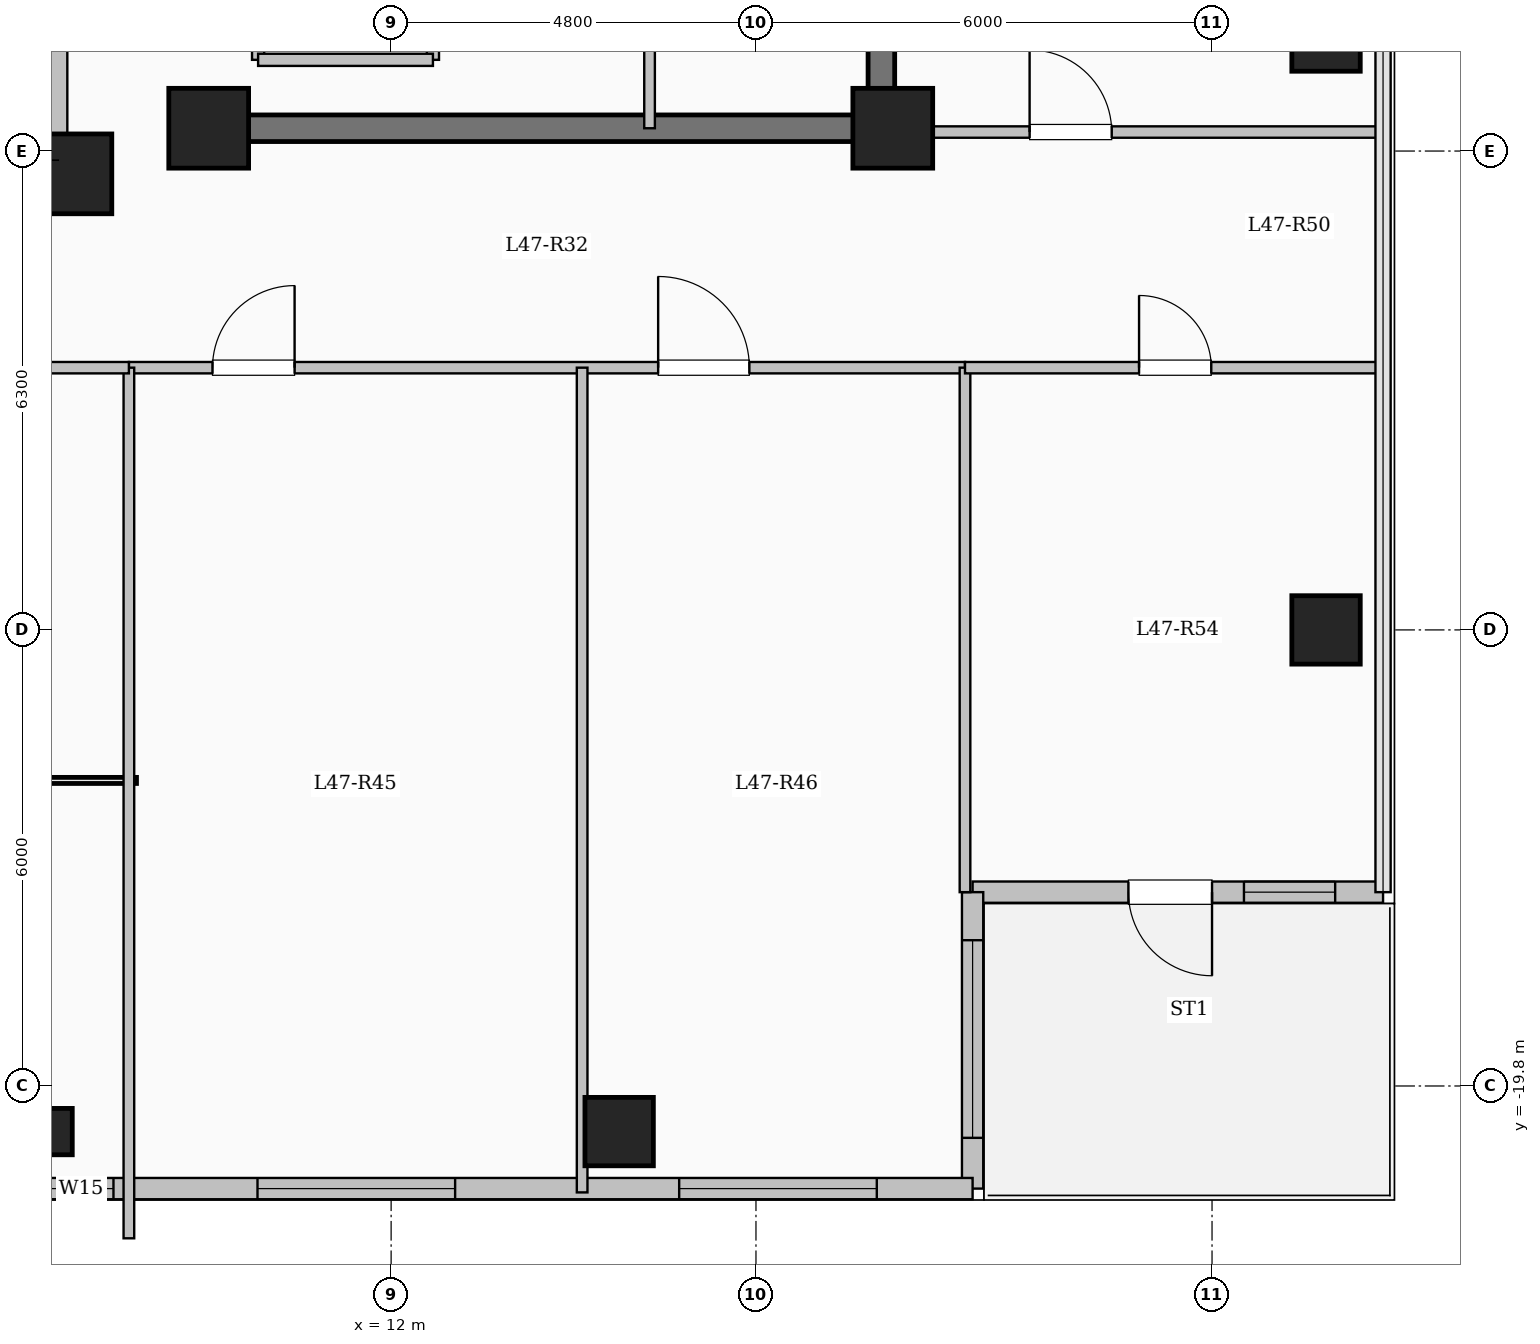
"""IFC4 building model, lengths in metres.
Left out: names, types, materials, properties, quantities, classifications, styles, units other than length and angle.
Written with IfcOpenShell. Run it as: python <this file> out.ifc"""

import sys

from ifc_helpers import new_model, si_unit, direction, frame, frame_2d, origin, origin_2d, place, context, subcontext, project, spatial, rectangle, hollow_circle, extrude, element, fill, save


model = new_model("IFC4")
c1 = context("Model", 3, precision=1e-05, world=origin(), true_north=direction((0.0, 1.0)))
c2 = subcontext(c1, "Body", "Model", "MODEL_VIEW")
j1 = project(units=[si_unit("LENGTHUNIT", "METRE"), si_unit("PLANEANGLEUNIT", "RADIAN")], contexts=[c1])
p1 = place(None, origin())
s1 = spatial("IfcSite", under=j1, at=p1, CompositionType="ELEMENT")
p2 = place(p1, origin())
s2 = spatial("IfcBuilding", under=s1, at=p2, CompositionType="ELEMENT")
p3 = place(p2, frame((0.0, 0.0, 172.8)))
s3 = spatial("IfcBuildingStorey", under=s2, at=p3, CompositionType="ELEMENT", Elevation=172.8)
for number, where, z_axis, x_axis in (
    (1, (7.8, -7.8, 0.0), (0.0, 0.0, 1.0), (1.0, 0.0, 0.0)),
    (2, (9.6, -7.2, 0.0), (0.0, 0.0, 1.0), (1.0, 0.0, 0.0)),
    (3, (18.6, -7.2, 0.0), (0.0, 0.0, 1.0), (1.0, 0.0, 0.0)),
):
    element("IfcColumn", number, at=place(p3, frame(where, z_axis=z_axis, x_axis=x_axis)), inside=s3, PredefinedType="COLUMN", context=c2, shape_type="SweptSolid", body=[
        extrude(rectangle(XDim=1.05, YDim=1.05, at=origin_2d()), origin(), (0.0, 0.0, 1.0), 4.5),
    ])
p4 = place(p3, frame((7.5, -20.4, 0.0), z_axis=(0.0, 0.0, 1.0), x_axis=(1.0, 0.0, 0.0)))
e4 = element("IfcColumn", 4, at=p4, inside=s3, PredefinedType="COLUMN", context=c2, shape_type="SweptSolid", body=[
    extrude(hollow_circle(Radius=0.305, WallThickness=0.025, at=origin_2d()), origin(), (0.0, 0.0, 1.0), 4.5),
])
for number, where, z_axis, x_axis in (
    (5, (15.0, -20.4, 0.0), (0.0, 0.0, 1.0), (1.0, 0.0, 0.0)),
    (6, (24.3, -13.8, 0.0), (0.0, 0.0, 1.0), (1.0, 0.0, 0.0)),
    (7, (24.3, -6.0, 0.0), (0.0, 0.0, 1.0), (1.0, 0.0, 0.0)),
):
    element("IfcColumn", number, at=place(p3, frame(where, z_axis=z_axis, x_axis=x_axis)), inside=s3, PredefinedType="COLUMN", context=c2, shape_type="SweptSolid", body=[
        extrude(rectangle(XDim=0.9, YDim=0.9, at=origin_2d()), origin(), (0.0, 0.0, 1.0), 4.5),
    ])
p5 = place(p3, frame((7.62, -7.62, 0.0), z_axis=(0.0, 0.0, 1.0), x_axis=(0.0, 1.0, 0.0)))
e8 = element("IfcWall", 8, at=p5, inside=s3, PredefinedType="SOLIDWALL", context=c2, shape_type="SweptSolid", body=[
    extrude(rectangle(XDim=15.24, YDim=0.24, at=frame_2d((7.62, 0.0))), origin(), (0.0, 0.0, 1.0), 4.2),
])
p6 = place(p5, frame((6.92, 0.0, 0.95)))
e9 = element("IfcOpeningElement", 9, at=p6, cuts=e8, PredefinedType="OPENING", context=c2, shape_type="SweptSolid", body=[
    extrude(rectangle(XDim=1.4, YDim=1.5, at=frame_2d((0.7, 0.75))), frame((0.0, 0.13, 0.0), z_axis=(0.0, -1.0, 0.0), x_axis=(1.0, 0.0, 0.0)), (0.0, 0.0, 1.0), 0.26),
])
p7 = place(p3, frame((25.05, -17.25, 0.0), z_axis=(0.0, 0.0, 1.0), x_axis=(-1.0, 0.0, 0.0)))
e10 = element("IfcWall", 10, at=p7, inside=s3, PredefinedType="SOLIDWALL", context=c2, shape_type="SweptSolid", body=[
    extrude(rectangle(XDim=5.4, YDim=0.28, at=frame_2d((2.7, 0.0))), origin(), (0.0, 0.0, 1.0), 4.2),
])
p8 = place(p7, frame((2.25, 0.0, 0.0)))
e11 = element("IfcOpeningElement", 11, at=p8, cuts=e10, PredefinedType="OPENING", context=c2, shape_type="SweptSolid", body=[
    extrude(rectangle(XDim=1.1, YDim=2.2, at=frame_2d((0.55, 1.1))), frame((0.0, 0.15, 0.0), z_axis=(0.0, -1.0, 0.0), x_axis=(1.0, 0.0, 0.0)), (0.0, 0.0, 1.0), 0.3),
])
p9 = place(p7, frame((0.63, 0.0, 0.95)))
e12 = element("IfcOpeningElement", 12, at=p9, cuts=e10, PredefinedType="OPENING", context=c2, shape_type="SweptSolid", body=[
    extrude(rectangle(XDim=1.2, YDim=1.5, at=frame_2d((0.6, 0.75))), frame((0.0, 0.15, 0.0), z_axis=(0.0, -1.0, 0.0), x_axis=(1.0, 0.0, 0.0)), (0.0, 0.0, 1.0), 0.3),
])
p10 = place(p3, frame((19.65, -17.25, 0.0), z_axis=(0.0, 0.0, 1.0), x_axis=(0.0, -1.0, 0.0)))
e13 = element("IfcWall", 13, at=p10, inside=s3, PredefinedType="SOLIDWALL", context=c2, shape_type="SweptSolid", body=[
    extrude(rectangle(XDim=3.9, YDim=0.28, at=frame_2d((1.95, 0.0))), origin(), (0.0, 0.0, 1.0), 4.2),
])
p11 = place(p10, frame((0.632, 0.0, 0.85)))
e14 = element("IfcOpeningElement", 14, at=p11, cuts=e13, PredefinedType="OPENING", context=c2, shape_type="SweptSolid", body=[
    extrude(rectangle(XDim=2.6, YDim=2.4, at=frame_2d((1.3, 1.2))), frame((0.0, 0.15, 0.0), z_axis=(0.0, -1.0, 0.0), x_axis=(1.0, 0.0, 0.0)), (0.0, 0.0, 1.0), 0.3),
])
p12 = place(p3, frame((19.65, -21.15, 0.0), z_axis=(0.0, 0.0, 1.0), x_axis=(-1.0, 0.0, 0.0)))
e15 = element("IfcWall", 15, at=p12, inside=s3, PredefinedType="SOLIDWALL", context=c2, shape_type="SweptSolid", body=[
    extrude(rectangle(XDim=12.3, YDim=0.28, at=frame_2d((6.15, 0.0))), origin(), (0.0, 0.0, 1.0), 4.2),
])
p13 = place(p12, frame((1.26, 0.0, 0.85)))
e16 = element("IfcOpeningElement", 16, at=p13, cuts=e15, PredefinedType="OPENING", context=c2, shape_type="SweptSolid", body=[
    extrude(rectangle(XDim=2.6, YDim=2.4, at=frame_2d((1.3, 1.2))), frame((0.0, 0.15, 0.0), z_axis=(0.0, -1.0, 0.0), x_axis=(1.0, 0.0, 0.0)), (0.0, 0.0, 1.0), 0.3),
])
p14 = place(p12, frame((6.808, 0.0, 0.85)))
e17 = element("IfcOpeningElement", 17, at=p14, cuts=e15, PredefinedType="OPENING", context=c2, shape_type="SweptSolid", body=[
    extrude(rectangle(XDim=2.6, YDim=2.4, at=frame_2d((1.3, 1.2))), frame((0.0, 0.15, 0.0), z_axis=(0.0, -1.0, 0.0), x_axis=(1.0, 0.0, 0.0)), (0.0, 0.0, 1.0), 0.3),
])
p15 = place(p12, frame((11.303, 0.0, 0.95)))
e18 = element("IfcOpeningElement", 18, at=p15, cuts=e15, PredefinedType="OPENING", context=c2, shape_type="SweptSolid", body=[
    extrude(rectangle(XDim=0.85, YDim=1.5, at=frame_2d((0.425, 0.75))), frame((0.0, 0.15, 0.0), z_axis=(0.0, -1.0, 0.0), x_axis=(1.0, 0.0, 0.0)), (0.0, 0.0, 1.0), 0.3),
])
p16 = place(p3, frame((10.25, -6.3, 0.0), z_axis=(0.0, 0.0, 1.0), x_axis=(0.0, 1.0, 0.0)))
e19 = element("IfcWall", 19, at=p16, inside=s3, PredefinedType="SOLIDWALL", context=c2, shape_type="SweptSolid", body=[
    extrude(rectangle(XDim=2.6, YDim=0.16, at=frame_2d((1.3, 0.0))), origin(), (0.0, 0.0, 1.0), 4.2),
])
p17 = place(p16, frame((0.75, 0.0, 0.0)))
e20 = element("IfcOpeningElement", 20, at=p17, cuts=e19, PredefinedType="OPENING", context=c2, shape_type="SweptSolid", body=[
    extrude(rectangle(XDim=1.1, YDim=2.15, at=frame_2d((0.55, 1.075))), frame((0.0, 0.09, 0.0), z_axis=(0.0, -1.0, 0.0), x_axis=(1.0, 0.0, 0.0)), (0.0, 0.0, 1.0), 0.18),
])
p18 = place(p3, frame((12.55, -6.3, 0.0), z_axis=(0.0, 0.0, 1.0), x_axis=(0.0, 1.0, 0.0)))
e21 = element("IfcWall", 21, at=p18, inside=s3, PredefinedType="SOLIDWALL", context=c2, shape_type="SweptSolid", body=[
    extrude(rectangle(XDim=2.6, YDim=0.16, at=frame_2d((1.3, 0.0))), origin(), (0.0, 0.0, 1.0), 4.2),
])
p19 = place(p3, frame((10.25, -6.3, 0.0), z_axis=(0.0, 0.0, 1.0), x_axis=(1.0, 0.0, 0.0)))
e22 = element("IfcWall", 22, at=p19, inside=s3, PredefinedType="SOLIDWALL", context=c2, shape_type="SweptSolid", body=[
    extrude(rectangle(XDim=2.3, YDim=0.16, at=frame_2d((1.15, 0.0))), origin(), (0.0, 0.0, 1.0), 4.2),
])
p20 = place(p3, frame((18.45, -7.375, 0.0), z_axis=(0.0, 0.0, 1.0), x_axis=(0.0, 1.0, 0.0)))
e23 = element("IfcWall", 23, at=p20, inside=s3, PredefinedType="SHEAR", context=c2, shape_type="SweptSolid", body=[
    extrude(rectangle(XDim=14.05, YDim=0.35, at=frame_2d((7.025, 0.0))), origin(), (0.0, 0.0, 1.0), 4.5),
])
p21 = place(p3, frame((10.075, -7.2, 0.0), z_axis=(0.0, 0.0, 1.0), x_axis=(1.0, 0.0, 0.0)))
e24 = element("IfcWall", 24, at=p21, inside=s3, PredefinedType="SHEAR", context=c2, shape_type="SweptSolid", body=[
    extrude(rectangle(XDim=8.55, YDim=0.35, at=frame_2d((4.275, 0.0))), origin(), (0.0, 0.0, 1.0), 4.5),
])
p22 = place(p3, frame((15.4, -7.2, 0.0), z_axis=(0.0, 0.0, 1.0), x_axis=(0.0, 1.0, 0.0)))
e25 = element("IfcWall", 25, at=p22, inside=s3, PredefinedType="PARTITIONING", context=c2, shape_type="SweptSolid", body=[
    extrude(rectangle(XDim=10.45, YDim=0.14, at=frame_2d((5.225, 0.0))), origin(), (0.0, 0.0, 1.0), 4.2),
])
p23 = place(p22, frame((9.25, 0.0, 0.0)))
e26 = element("IfcOpeningElement", 26, at=p23, cuts=e25, PredefinedType="OPENING", context=c2, shape_type="SweptSolid", body=[
    extrude(rectangle(XDim=0.9, YDim=2.08, at=frame_2d((0.45, 1.04))), frame((0.0, 0.08, 0.0), z_axis=(0.0, -1.0, 0.0), x_axis=(1.0, 0.0, 0.0)), (0.0, 0.0, 1.0), 0.16),
])
p24 = place(p3, frame((8.55, -10.35, 0.0), z_axis=(0.0, 0.0, 1.0), x_axis=(1.0, 0.0, 0.0)))
e27 = element("IfcWall", 27, at=p24, inside=s3, PredefinedType="PARTITIONING", context=c2, shape_type="SweptSolid", body=[
    extrude(rectangle(XDim=11.0, YDim=0.15, at=frame_2d((5.5, 0.0))), origin(), (0.0, 0.0, 1.0), 4.2),
])
p25 = place(p24, frame((1.1, 0.0, 0.0)))
e28 = element("IfcOpeningElement", 28, at=p25, cuts=e27, PredefinedType="OPENING", context=c2, shape_type="SweptSolid", body=[
    extrude(rectangle(XDim=1.08, YDim=2.15, at=frame_2d((0.54, 1.075))), frame((0.0, 0.085, 0.0), z_axis=(0.0, -1.0, 0.0), x_axis=(1.0, 0.0, 0.0)), (0.0, 0.0, 1.0), 0.17),
])
p26 = place(p24, frame((6.963, 0.0, 0.0)))
e29 = element("IfcOpeningElement", 29, at=p26, cuts=e27, PredefinedType="OPENING", context=c2, shape_type="SweptSolid", body=[
    extrude(rectangle(XDim=1.2, YDim=2.15, at=frame_2d((0.6, 1.075))), frame((0.0, 0.085, 0.0), z_axis=(0.0, -1.0, 0.0), x_axis=(1.0, 0.0, 0.0)), (0.0, 0.0, 1.0), 0.17),
])
p27 = place(p3, frame((8.55, -21.804, 0.0), z_axis=(0.0, 0.0, 1.0), x_axis=(0.0, 1.0, 0.0)))
e30 = element("IfcWall", 30, at=p27, inside=s3, PredefinedType="PARTITIONING", context=c2, shape_type="SweptSolid", body=[
    extrude(rectangle(XDim=11.454, YDim=0.14, at=frame_2d((5.727, 0.0))), origin(), (0.0, 0.0, 1.0), 4.2),
])
p28 = place(p3, frame((14.513, -21.2, 0.0), z_axis=(0.0, 0.0, 1.0), x_axis=(0.0, 1.0, 0.0)))
e31 = element("IfcWall", 31, at=p28, inside=s3, PredefinedType="PARTITIONING", context=c2, shape_type="SweptSolid", body=[
    extrude(rectangle(XDim=10.85, YDim=0.14, at=frame_2d((5.425, 0.0))), origin(), (0.0, 0.0, 1.0), 4.2),
])
p29 = place(p3, frame((-8.55, -10.35, 0.0), z_axis=(0.0, 0.0, 1.0), x_axis=(1.0, 0.0, 0.0)))
e32 = element("IfcWall", 32, at=p29, inside=s3, PredefinedType="PARTITIONING", context=c2, shape_type="SweptSolid", body=[
    extrude(rectangle(XDim=17.1, YDim=0.15, at=frame_2d((8.55, 0.0))), origin(), (0.0, 0.0, 1.0), 4.2),
])
p30 = place(p29, frame((1.4, 0.0, 0.0)))
e33 = element("IfcOpeningElement", 33, at=p30, cuts=e32, PredefinedType="OPENING", context=c2, shape_type="SweptSolid", body=[
    extrude(rectangle(XDim=1.2, YDim=2.15, at=frame_2d((0.6, 1.075))), frame((0.0, 0.085, 0.0), z_axis=(0.0, -1.0, 0.0), x_axis=(1.0, 0.0, 0.0)), (0.0, 0.0, 1.0), 0.17),
])
p31 = place(p3, frame((18.45, -7.25, 0.0), z_axis=(0.0, 0.0, 1.0), x_axis=(1.0, 0.0, 0.0)))
e34 = element("IfcWall", 34, at=p31, inside=s3, PredefinedType="PARTITIONING", context=c2, shape_type="SweptSolid", body=[
    extrude(rectangle(XDim=6.63, YDim=0.15, at=frame_2d((3.315, 0.0))), origin(), (0.0, 0.0, 1.0), 4.2),
])
p32 = place(p31, frame((1.95, 0.0, 0.0)))
e35 = element("IfcOpeningElement", 35, at=p32, cuts=e34, PredefinedType="OPENING", context=c2, shape_type="SweptSolid", body=[
    extrude(rectangle(XDim=1.08, YDim=2.15, at=frame_2d((0.54, 1.075))), frame((0.0, 0.085, 0.0), z_axis=(0.0, -1.0, 0.0), x_axis=(1.0, 0.0, 0.0)), (0.0, 0.0, 1.0), 0.17),
])
p33 = place(p3, frame((19.55, -17.25, 0.0), z_axis=(0.0, 0.0, 1.0), x_axis=(0.0, 1.0, 0.0)))
e36 = element("IfcWall", 36, at=p33, inside=s3, PredefinedType="PARTITIONING", context=c2, shape_type="SweptSolid", body=[
    extrude(rectangle(XDim=6.9, YDim=0.14, at=frame_2d((3.45, 0.0))), origin(), (0.0, 0.0, 1.0), 4.2),
])
p34 = place(p3, frame((19.55, -10.35, 0.0), z_axis=(0.0, 0.0, 1.0), x_axis=(1.0, 0.0, 0.0)))
e37 = element("IfcWall", 37, at=p34, inside=s3, PredefinedType="PARTITIONING", context=c2, shape_type="SweptSolid", body=[
    extrude(rectangle(XDim=5.53, YDim=0.15, at=frame_2d((2.765, 0.0))), origin(), (0.0, 0.0, 1.0), 4.2),
])
p35 = place(p34, frame((2.29, 0.0, 0.0)))
e38 = element("IfcOpeningElement", 38, at=p35, cuts=e37, PredefinedType="OPENING", context=c2, shape_type="SweptSolid", body=[
    extrude(rectangle(XDim=0.95, YDim=2.15, at=frame_2d((0.475, 1.075))), frame((0.0, 0.085, 0.0), z_axis=(0.0, -1.0, 0.0), x_axis=(1.0, 0.0, 0.0)), (0.0, 0.0, 1.0), 0.17),
])
p36 = place(p8, origin())
e39 = element("IfcDoor", 39, at=p36, inside=s3, OperationType="SINGLE_SWING_LEFT", PredefinedType="DOOR", context=c2, shape_type="SweptSolid", body=[
    extrude(rectangle(XDim=1.1, YDim=2.2, at=frame_2d((0.55, 1.1))), frame((0.0, 0.025, 0.0), z_axis=(0.0, -1.0, 0.0), x_axis=(1.0, 0.0, 0.0)), (0.0, 0.0, 1.0), 0.05),
])
fill(e11, e39)
p37 = place(p9, origin())
e40 = element("IfcWindow", 40, at=p37, inside=s3, PartitioningType="SINGLE_PANEL", PredefinedType="WINDOW", context=c2, shape_type="SweptSolid", body=[
    extrude(rectangle(XDim=1.2, YDim=1.5, at=frame_2d((0.6, 0.75))), frame((0.0, 0.03, 0.0), z_axis=(0.0, -1.0, 0.0), x_axis=(1.0, 0.0, 0.0)), (0.0, 0.0, 1.0), 0.06),
])
fill(e12, e40)
p38 = place(p11, origin())
e41 = element("IfcWindow", 41, at=p38, inside=s3, PartitioningType="SINGLE_PANEL", PredefinedType="WINDOW", context=c2, shape_type="SweptSolid", body=[
    extrude(rectangle(XDim=2.6, YDim=2.4, at=frame_2d((1.3, 1.2))), frame((0.0, 0.03, 0.0), z_axis=(0.0, -1.0, 0.0), x_axis=(1.0, 0.0, 0.0)), (0.0, 0.0, 1.0), 0.06),
])
fill(e14, e41)
p39 = place(p13, origin())
e42 = element("IfcWindow", 42, at=p39, inside=s3, PartitioningType="SINGLE_PANEL", PredefinedType="WINDOW", context=c2, shape_type="SweptSolid", body=[
    extrude(rectangle(XDim=2.6, YDim=2.4, at=frame_2d((1.3, 1.2))), frame((0.0, 0.03, 0.0), z_axis=(0.0, -1.0, 0.0), x_axis=(1.0, 0.0, 0.0)), (0.0, 0.0, 1.0), 0.06),
])
fill(e16, e42)
p40 = place(p14, origin())
e43 = element("IfcWindow", 43, at=p40, inside=s3, PartitioningType="SINGLE_PANEL", PredefinedType="WINDOW", context=c2, shape_type="SweptSolid", body=[
    extrude(rectangle(XDim=2.6, YDim=2.4, at=frame_2d((1.3, 1.2))), frame((0.0, 0.03, 0.0), z_axis=(0.0, -1.0, 0.0), x_axis=(1.0, 0.0, 0.0)), (0.0, 0.0, 1.0), 0.06),
])
fill(e17, e43)
p41 = place(p15, origin())
e44 = element("IfcWindow", 44, at=p41, inside=s3, PartitioningType="SINGLE_PANEL", PredefinedType="WINDOW", context=c2, shape_type="SweptSolid", body=[
    extrude(rectangle(XDim=0.85, YDim=1.5, at=frame_2d((0.425, 0.75))), frame((0.0, 0.03, 0.0), z_axis=(0.0, -1.0, 0.0), x_axis=(1.0, 0.0, 0.0)), (0.0, 0.0, 1.0), 0.06),
])
fill(e18, e44)
p42 = place(p25, origin())
e45 = element("IfcDoor", 45, at=p42, inside=s3, OperationType="SINGLE_SWING_RIGHT", PredefinedType="DOOR", context=c2, shape_type="SweptSolid", body=[
    extrude(rectangle(XDim=1.08, YDim=2.15, at=frame_2d((0.54, 1.075))), frame((0.0, 0.025, 0.0), z_axis=(0.0, -1.0, 0.0), x_axis=(1.0, 0.0, 0.0)), (0.0, 0.0, 1.0), 0.05),
])
fill(e28, e45)
p43 = place(p26, origin())
e46 = element("IfcDoor", 46, at=p43, inside=s3, OperationType="SINGLE_SWING_LEFT", PredefinedType="DOOR", context=c2, shape_type="SweptSolid", body=[
    extrude(rectangle(XDim=1.2, YDim=2.15, at=frame_2d((0.6, 1.075))), frame((0.0, 0.025, 0.0), z_axis=(0.0, -1.0, 0.0), x_axis=(1.0, 0.0, 0.0)), (0.0, 0.0, 1.0), 0.05),
])
fill(e29, e46)
p44 = place(p35, origin())
e47 = element("IfcDoor", 47, at=p44, inside=s3, OperationType="SINGLE_SWING_LEFT", PredefinedType="DOOR", context=c2, shape_type="SweptSolid", body=[
    extrude(rectangle(XDim=0.95, YDim=2.15, at=frame_2d((0.475, 1.075))), frame((0.0, 0.025, 0.0), z_axis=(0.0, -1.0, 0.0), x_axis=(1.0, 0.0, 0.0)), (0.0, 0.0, 1.0), 0.05),
])
fill(e38, e47)
p45 = place(p32, origin())
e48 = element("IfcDoor", 48, at=p45, inside=s3, OperationType="SINGLE_SWING_LEFT", PredefinedType="DOOR", context=c2, shape_type="SweptSolid", body=[
    extrude(rectangle(XDim=1.08, YDim=2.15, at=frame_2d((0.54, 1.075))), frame((0.0, 0.025, 0.0), z_axis=(0.0, -1.0, 0.0), x_axis=(1.0, 0.0, 0.0)), (0.0, 0.0, 1.0), 0.05),
])
fill(e35, e48)
save(model, sys.argv[1])
